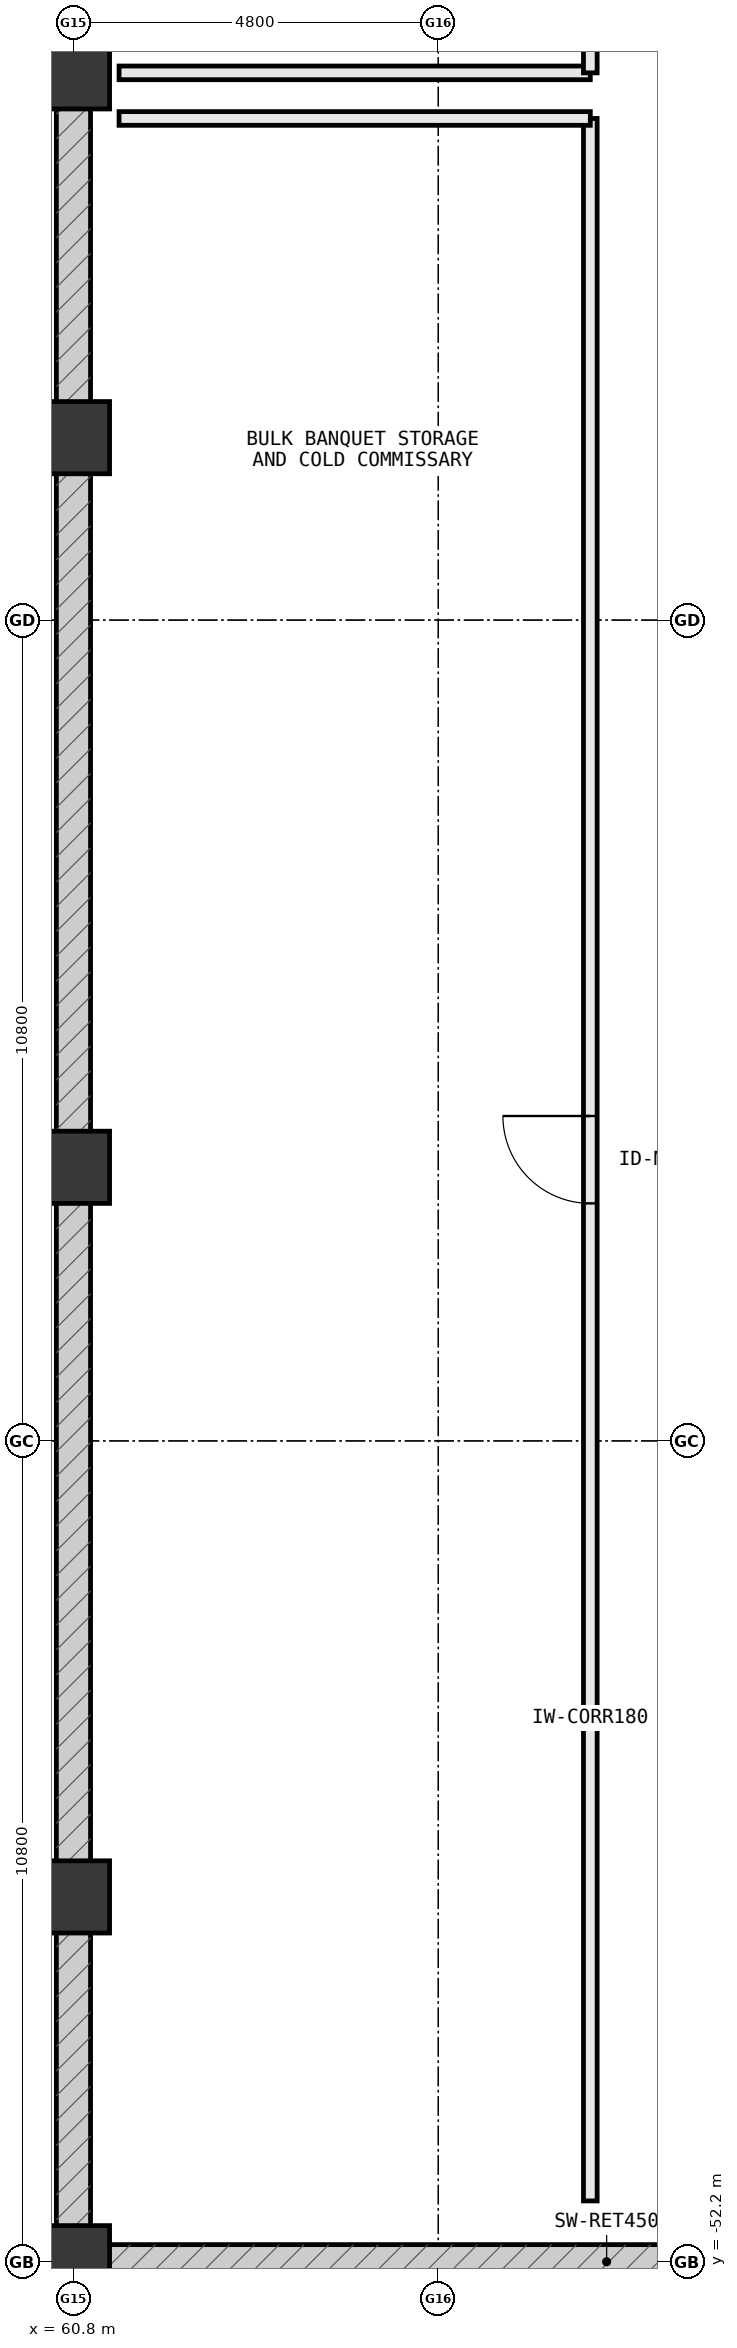
"""IFC4 building model, lengths in metres.
Left out: names, types, materials, properties, quantities, classifications, styles, units other than length and angle.
Written with IfcOpenShell. Run it as: python <this file> out.ifc"""

import sys

from ifc_helpers import new_model, si_unit, direction, frame, frame_2d, origin, origin_2d, place, context, subcontext, project, spatial, rectangle, extrude, element, fill, save


model = new_model("IFC4")
c1 = context("Model", 3, precision=1e-05, world=origin(), true_north=direction((0.0, 1.0)))
c2 = subcontext(c1, "Body", "Model", "MODEL_VIEW")
j1 = project(units=[si_unit("LENGTHUNIT", "METRE"), si_unit("PLANEANGLEUNIT", "RADIAN")], contexts=[c1])
p1 = place(None, origin())
s1 = spatial("IfcSite", under=j1, at=p1, CompositionType="ELEMENT")
p2 = place(p1, origin())
s2 = spatial("IfcBuilding", under=s1, at=p2, CompositionType="ELEMENT")
p3 = place(p2, frame((0.0, 0.0, -4.5)))
s3 = spatial("IfcBuildingStorey", under=s2, at=p3, CompositionType="ELEMENT", Elevation=-4.5)
for number, where, z_axis, x_axis in (
    (1, (60.8, -52.2, 0.0), (0.0, 0.0, 1.0), (1.0, 0.0, 0.0)),
    (2, (60.8, -47.4, 0.0), (0.0, 0.0, 1.0), (1.0, 0.0, 0.0)),
    (3, (60.8, -37.8, 0.0), (0.0, 0.0, 1.0), (1.0, 0.0, 0.0)),
    (4, (60.8, -28.2, 0.0), (0.0, 0.0, 1.0), (1.0, 0.0, 0.0)),
    (5, (60.8, -23.4, 0.0), (0.0, 0.0, 1.0), (1.0, 0.0, 0.0)),
):
    element("IfcColumn", number, at=place(p3, frame(where, z_axis=z_axis, x_axis=x_axis)), inside=s3, PredefinedType="COLUMN", context=c2, shape_type="SweptSolid", body=[
        extrude(rectangle(XDim=0.95, YDim=0.95, at=origin_2d()), origin(), (0.0, 0.0, 1.0), 4.5),
    ])
p4 = place(p3, frame((60.8, 17.4, 0.0), z_axis=(0.0, 0.0, 1.0), x_axis=(0.0, -1.0, 0.0)))
e6 = element("IfcWall", 6, at=p4, inside=s3, PredefinedType="USERDEFINED", context=c2, shape_type="SweptSolid", body=[
    extrude(rectangle(XDim=69.6, YDim=0.45, at=frame_2d((34.8, 0.0))), origin(), (0.0, 0.0, 1.0), 4.2),
])
p5 = place(p3, frame((60.8, -52.2, 0.0), z_axis=(0.0, 0.0, 1.0), x_axis=(1.0, 0.0, 0.0)))
e7 = element("IfcWall", 7, at=p5, inside=s3, PredefinedType="USERDEFINED", context=c2, shape_type="SweptSolid", body=[
    extrude(rectangle(XDim=23.2, YDim=0.45, at=frame_2d((11.6, 0.0))), origin(), (0.0, 0.0, 1.0), 4.2),
])
p6 = place(p3, frame((67.6, -51.4, 0.0), z_axis=(0.0, 0.0, 1.0), x_axis=(0.0, 1.0, 0.0)))
e8 = element("IfcWall", 8, at=p6, inside=s3, PredefinedType="PARTITIONING", context=c2, shape_type="SweptSolid", body=[
    extrude(rectangle(XDim=27.4, YDim=0.18, at=frame_2d((13.7, 0.0))), origin(), (0.0, 0.0, 1.0), 4.2),
])
p7 = place(p6, frame((13.125, 0.0, 0.0)))
e9 = element("IfcOpeningElement", 9, at=p7, cuts=e8, PredefinedType="OPENING", context=c2, shape_type="SweptSolid", body=[
    extrude(rectangle(XDim=1.15, YDim=2.2, at=frame_2d((0.575, 1.1))), frame((0.0, 0.102, 0.0), z_axis=(0.0, -1.0, 0.0), x_axis=(1.0, 0.0, 0.0)), (0.0, 0.0, 1.0), 0.204),
])
p8 = place(p3, frame((67.6, -24.0, 0.0), z_axis=(0.0, 0.0, 1.0), x_axis=(-1.0, 0.0, 0.0)))
e10 = element("IfcWall", 10, at=p8, inside=s3, PredefinedType="PARTITIONING", context=c2, shape_type="SweptSolid", body=[
    extrude(rectangle(XDim=6.2, YDim=0.18, at=frame_2d((3.1, 0.0))), origin(), (0.0, 0.0, 1.0), 4.2),
])
p9 = place(p3, frame((61.4, -23.4, 0.0), z_axis=(0.0, 0.0, 1.0), x_axis=(1.0, 0.0, 0.0)))
e11 = element("IfcWall", 11, at=p9, inside=s3, PredefinedType="PARTITIONING", context=c2, shape_type="SweptSolid", body=[
    extrude(rectangle(XDim=6.2, YDim=0.18, at=frame_2d((3.1, 0.0))), origin(), (0.0, 0.0, 1.0), 3.045),
])
p10 = place(p3, frame((67.6, -23.4, 0.0), z_axis=(0.0, 0.0, 1.0), x_axis=(0.0, 1.0, 0.0)))
e12 = element("IfcWall", 12, at=p10, inside=s3, PredefinedType="PARTITIONING", context=c2, shape_type="SweptSolid", body=[
    extrude(rectangle(XDim=21.4, YDim=0.18, at=frame_2d((10.7, 0.0))), origin(), (0.0, 0.0, 1.0), 4.2),
])
p11 = place(p10, frame((10.125, 0.0, 0.0)))
e13 = element("IfcOpeningElement", 13, at=p11, cuts=e12, PredefinedType="OPENING", context=c2, shape_type="SweptSolid", body=[
    extrude(rectangle(XDim=1.15, YDim=2.2, at=frame_2d((0.575, 1.1))), frame((0.0, 0.102, 0.0), z_axis=(0.0, -1.0, 0.0), x_axis=(1.0, 0.0, 0.0)), (0.0, 0.0, 1.0), 0.204),
])
p12 = place(p7, origin())
e14 = element("IfcDoor", 14, at=p12, inside=s3, OperationType="SINGLE_SWING_RIGHT", PredefinedType="DOOR", context=c2, shape_type="SweptSolid", body=[
    extrude(rectangle(XDim=1.15, YDim=2.2, at=frame_2d((0.575, 1.1))), frame((0.0, 0.025, 0.0), z_axis=(0.0, -1.0, 0.0), x_axis=(1.0, 0.0, 0.0)), (0.0, 0.0, 1.0), 0.05),
])
fill(e9, e14)
save(model, sys.argv[1])
